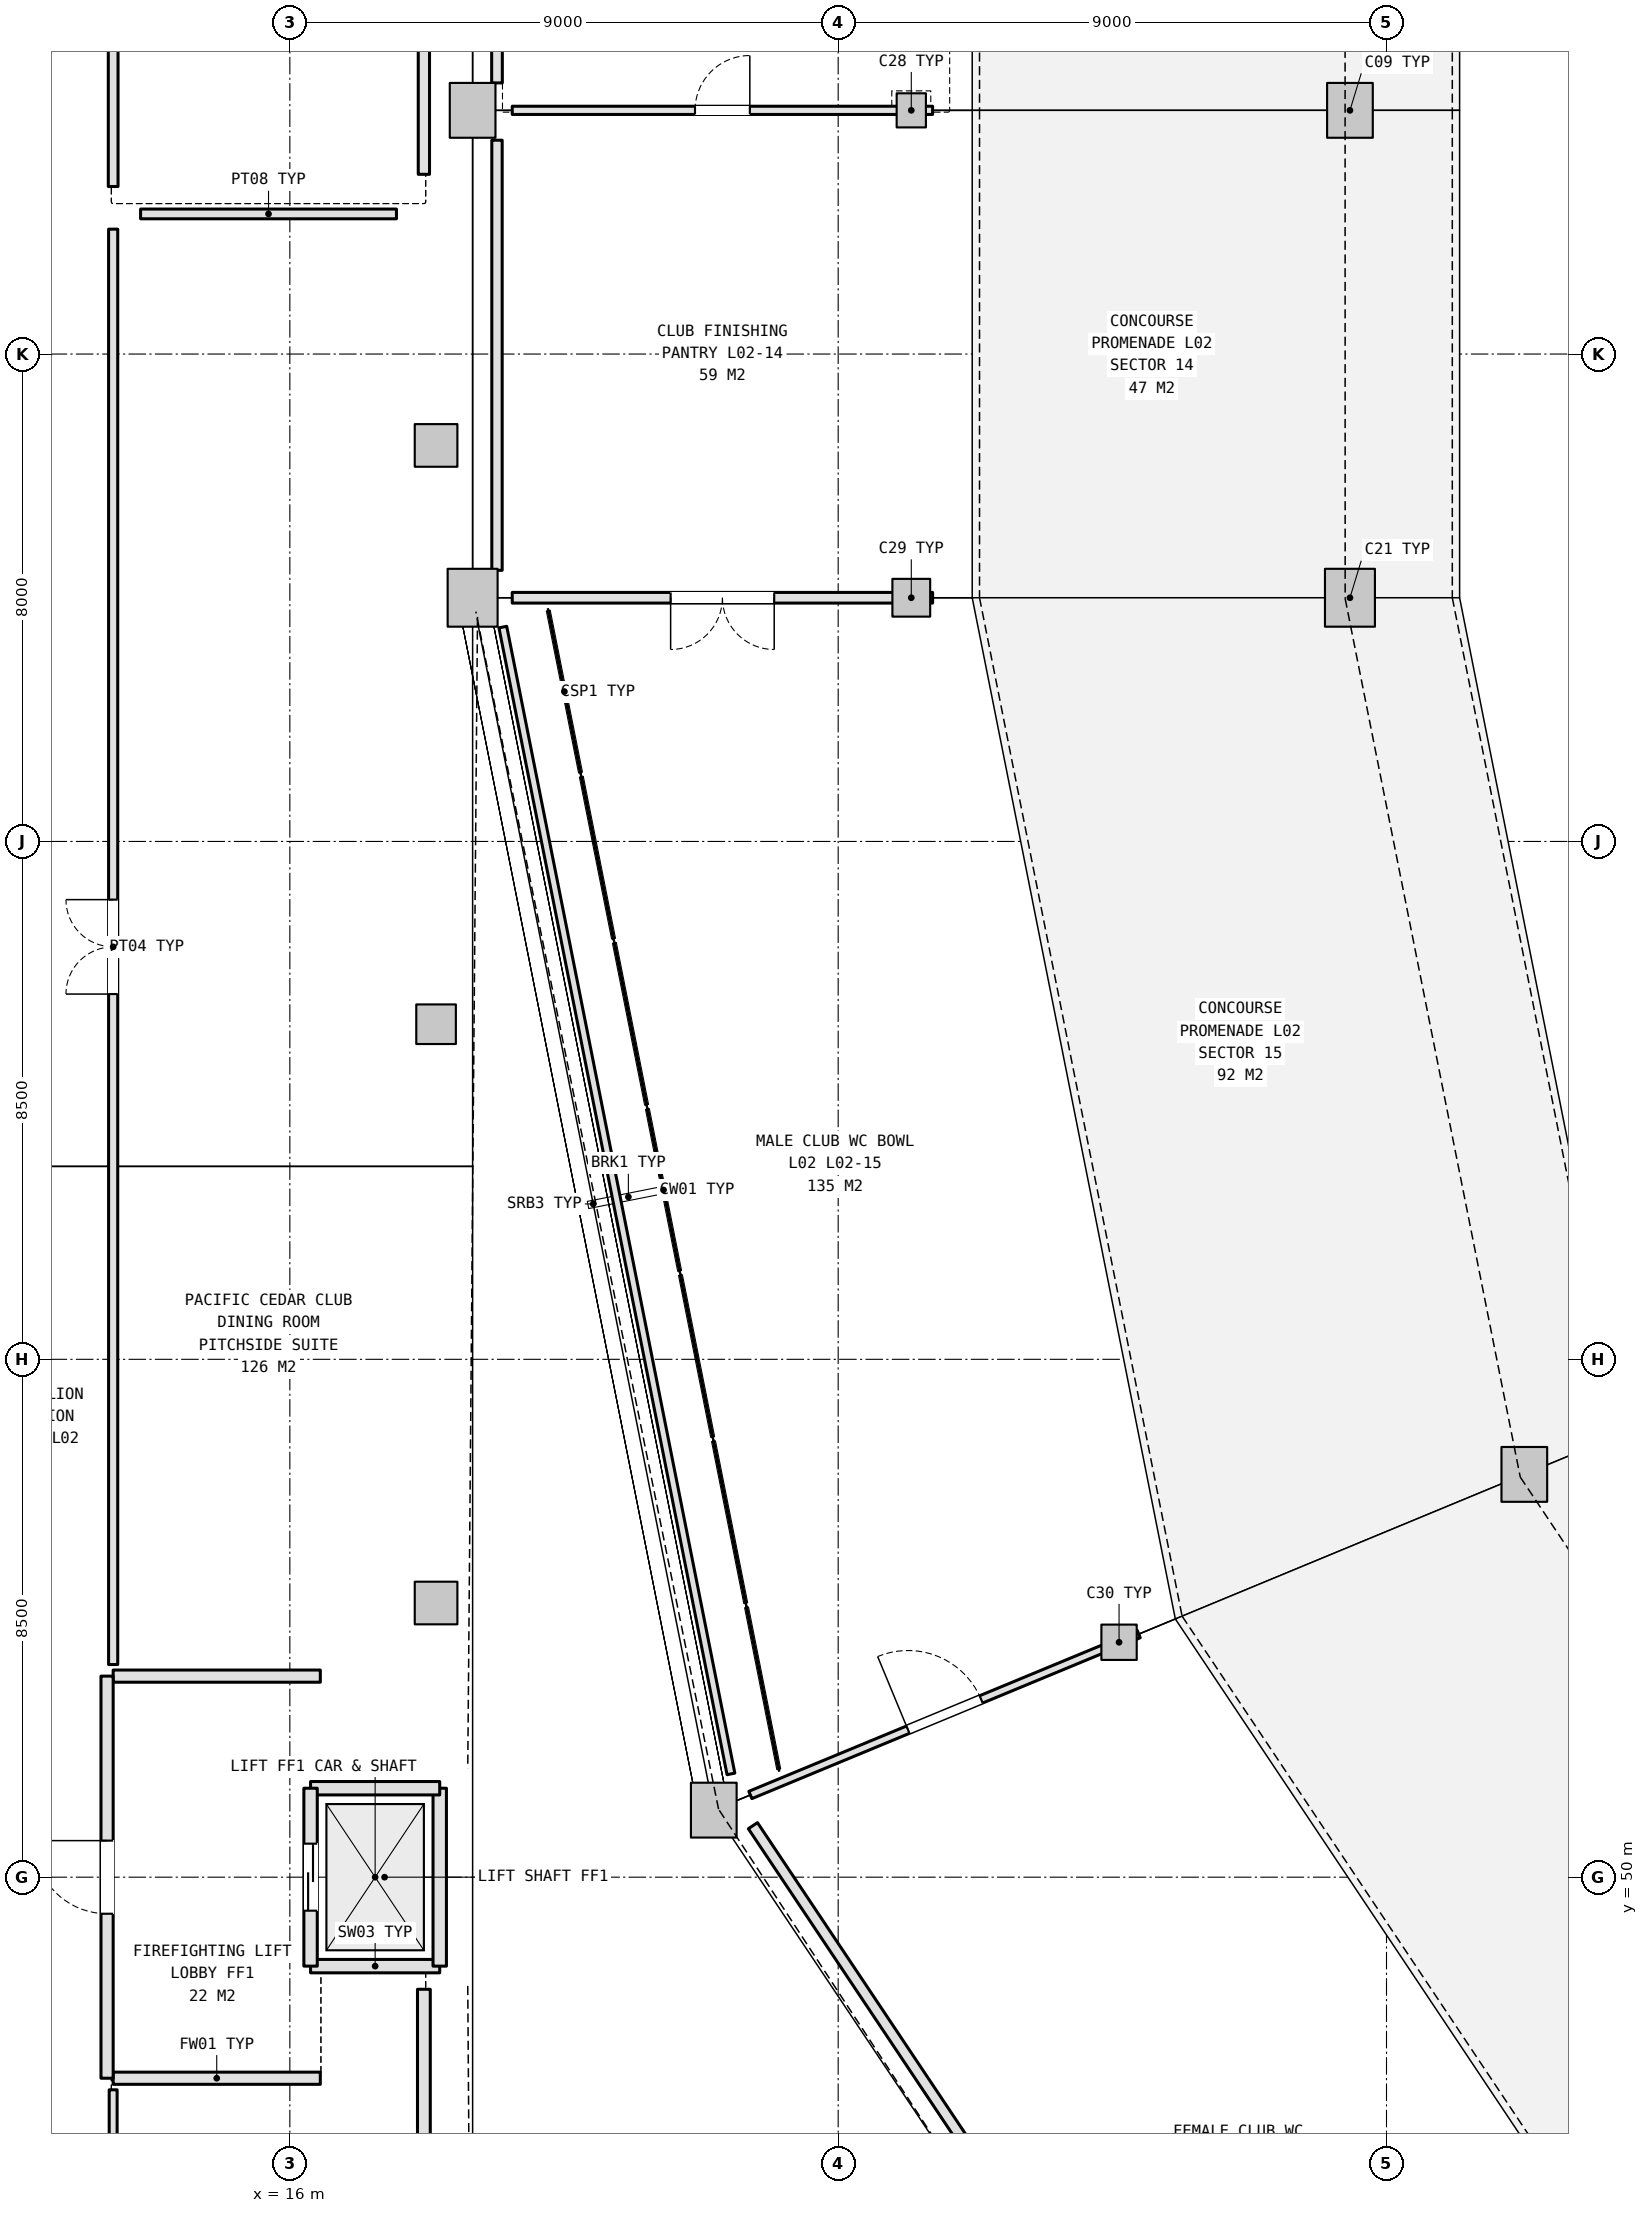
"""IFC4 building model, lengths in metres.
Left out: names, types, materials, properties, quantities, classifications, styles, units other than length and angle.
Written with IfcOpenShell. Run it as: python <this file> out.ifc"""

import sys

from ifc_helpers import new_model, si_unit, direction, frame, frame_2d, origin, origin_2d, place, context, subcontext, project, spatial, rectangle, extrude, element, fill, save


model = new_model("IFC4")
c1 = context("Model", 3, precision=1e-05, world=origin(), true_north=direction((0.0, 1.0)))
c2 = subcontext(c1, "Body", "Model", "MODEL_VIEW")
j1 = project(units=[si_unit("LENGTHUNIT", "METRE"), si_unit("PLANEANGLEUNIT", "RADIAN")], contexts=[c1])
p1 = place(None, origin())
s1 = spatial("IfcSite", under=j1, at=p1, CompositionType="ELEMENT")
p2 = place(p1, origin())
s2 = spatial("IfcBuilding", under=s1, at=p2, CompositionType="ELEMENT")
p3 = place(p2, frame((0.0, 0.0, 10.8)))
s3 = spatial("IfcBuildingStorey", under=s2, at=p3, CompositionType="ELEMENT", Elevation=10.8)
p4 = place(p3, frame((33.4, 79.0, 0.0), z_axis=(0.0, 0.0, 1.0), x_axis=(1.0, 0.0, 0.0)))
e1 = element("IfcColumn", 1, at=p4, inside=s3, PredefinedType="COLUMN", context=c2, shape_type="SweptSolid", body=[
    extrude(rectangle(XDim=0.75, YDim=0.9, at=origin_2d()), origin(), (0.0, 0.0, 1.0), 5.4),
])
p5 = place(p3, frame((26.2, 79.0, 0.0), z_axis=(0.0, 0.0, 1.0), x_axis=(1.0, 0.0, 0.0)))
e2 = element("IfcColumn", 2, at=p5, inside=s3, PredefinedType="COLUMN", context=c2, shape_type="SweptSolid", body=[
    extrude(rectangle(XDim=0.48, YDim=0.56, at=origin_2d()), origin(), (0.0, 0.0, 1.0), 5.4),
])
p6 = place(p3, frame((19.0, 79.0, 0.0), z_axis=(0.0, 0.0, 1.0), x_axis=(1.0, 0.0, 0.0)))
e3 = element("IfcColumn", 3, at=p6, inside=s3, PredefinedType="COLUMN", context=c2, shape_type="SweptSolid", body=[
    extrude(rectangle(XDim=0.75, YDim=0.9, at=origin_2d()), origin(), (0.0, 0.0, 1.0), 5.4),
])
p7 = place(p3, frame((33.4, 71.0, 0.0), z_axis=(0.0, 0.0, 1.0), x_axis=(1.0, 0.0, 0.0)))
e4 = element("IfcColumn", 4, at=p7, inside=s3, PredefinedType="COLUMN", context=c2, shape_type="SweptSolid", body=[
    extrude(rectangle(XDim=0.82, YDim=0.95, at=origin_2d()), origin(), (0.0, 0.0, 1.0), 5.4),
])
p8 = place(p3, frame((26.2, 71.0, 0.0), z_axis=(0.0, 0.0, 1.0), x_axis=(1.0, 0.0, 0.0)))
e5 = element("IfcColumn", 5, at=p8, inside=s3, PredefinedType="COLUMN", context=c2, shape_type="SweptSolid", body=[
    extrude(rectangle(XDim=0.62, YDim=0.62, at=origin_2d()), origin(), (0.0, 0.0, 1.0), 5.4),
])
p9 = place(p3, frame((19.0, 71.0, 0.0), z_axis=(0.0, 0.0, 1.0), x_axis=(1.0, 0.0, 0.0)))
e6 = element("IfcColumn", 6, at=p9, inside=s3, PredefinedType="COLUMN", context=c2, shape_type="SweptSolid", body=[
    extrude(rectangle(XDim=0.82, YDim=0.95, at=origin_2d()), origin(), (0.0, 0.0, 1.0), 5.4),
])
p10 = place(p3, frame((36.262, 56.611, 0.0), z_axis=(0.0, 0.0, 1.0), x_axis=(1.0, 0.0, 0.0)))
e7 = element("IfcColumn", 7, at=p10, inside=s3, PredefinedType="COLUMN", context=c2, shape_type="SweptSolid", body=[
    extrude(rectangle(XDim=0.75, YDim=0.9, at=origin_2d()), origin(), (0.0, 0.0, 1.0), 5.4),
])
p11 = place(p3, frame((29.61, 53.856, 0.0), z_axis=(0.0, 0.0, 1.0), x_axis=(1.0, 0.0, 0.0)))
e8 = element("IfcColumn", 8, at=p11, inside=s3, PredefinedType="COLUMN", context=c2, shape_type="SweptSolid", body=[
    extrude(rectangle(XDim=0.58, YDim=0.58, at=origin_2d()), origin(), (0.0, 0.0, 1.0), 5.4),
])
p12 = place(p3, frame((22.958, 51.1, 0.0), z_axis=(0.0, 0.0, 1.0), x_axis=(1.0, 0.0, 0.0)))
e9 = element("IfcColumn", 9, at=p12, inside=s3, PredefinedType="COLUMN", context=c2, shape_type="SweptSolid", body=[
    extrude(rectangle(XDim=0.75, YDim=0.9, at=origin_2d()), origin(), (0.0, 0.0, 1.0), 5.4),
])
p13 = place(p3, frame((18.4, 54.5, 0.0), z_axis=(0.0, 0.0, 1.0), x_axis=(1.0, 0.0, 0.0)))
e10 = element("IfcColumn", 10, at=p13, inside=s3, PredefinedType="COLUMN", context=c2, shape_type="SweptSolid", body=[
    extrude(rectangle(XDim=0.7, YDim=0.7, at=origin_2d()), origin(), (0.0, 0.0, 1.0), 5.4),
])
p14 = place(p3, frame((18.4, 64.0, 0.0), z_axis=(0.0, 0.0, 1.0), x_axis=(1.0, 0.0, 0.0)))
e11 = element("IfcColumn", 11, at=p14, inside=s3, PredefinedType="COLUMN", context=c2, shape_type="SweptSolid", body=[
    extrude(rectangle(XDim=0.65, YDim=0.65, at=origin_2d()), origin(), (0.0, 0.0, 1.0), 5.4),
])
p15 = place(p3, frame((18.4, 73.5, 0.0), z_axis=(0.0, 0.0, 1.0), x_axis=(1.0, 0.0, 0.0)))
e12 = element("IfcColumn", 12, at=p15, inside=s3, PredefinedType="COLUMN", context=c2, shape_type="SweptSolid", body=[
    extrude(rectangle(XDim=0.7, YDim=0.7, at=origin_2d()), origin(), (0.0, 0.0, 1.0), 5.4),
])
p16 = place(p3, frame((16.34, 48.54, 0.0), z_axis=(0.0, 0.0, 1.0), x_axis=(1.0, 0.0, 0.0)))
e13 = element("IfcWall", 13, at=p16, inside=s3, PredefinedType="SHEAR", context=c2, shape_type="SweptSolid", body=[
    extrude(rectangle(XDim=2.12, YDim=0.22, at=frame_2d((1.06, 0.0))), origin(), (0.0, 0.0, 1.0), 5.15),
])
p17 = place(p3, frame((18.46, 48.54, 0.0), z_axis=(0.0, 0.0, 1.0), x_axis=(0.0, 1.0, 0.0)))
e14 = element("IfcWall", 14, at=p17, inside=s3, PredefinedType="SHEAR", context=c2, shape_type="SweptSolid", body=[
    extrude(rectangle(XDim=2.92, YDim=0.22, at=frame_2d((1.46, 0.0))), origin(), (0.0, 0.0, 1.0), 5.15),
])
p18 = place(p3, frame((18.46, 51.46, 0.0), z_axis=(0.0, 0.0, 1.0), x_axis=(-1.0, 0.0, 0.0)))
e15 = element("IfcWall", 15, at=p18, inside=s3, PredefinedType="SHEAR", context=c2, shape_type="SweptSolid", body=[
    extrude(rectangle(XDim=2.12, YDim=0.22, at=frame_2d((1.06, 0.0))), origin(), (0.0, 0.0, 1.0), 5.15),
])
p19 = place(p3, frame((16.34, 51.46, 0.0), z_axis=(0.0, 0.0, 1.0), x_axis=(0.0, -1.0, 0.0)))
e16 = element("IfcWall", 16, at=p19, inside=s3, PredefinedType="SHEAR", context=c2, shape_type="SweptSolid", body=[
    extrude(rectangle(XDim=2.92, YDim=0.22, at=frame_2d((1.46, 0.0))), origin(), (0.0, 0.0, 1.0), 5.15),
])
p20 = place(p19, frame((0.91, 0.0, 0.0)))
e17 = element("IfcOpeningElement", 17, at=p20, cuts=e16, PredefinedType="OPENING", context=c2, shape_type="SweptSolid", body=[
    extrude(rectangle(XDim=1.1, YDim=2.2, at=frame_2d((0.55, 1.1))), frame((0.0, 0.12, 0.0), z_axis=(0.0, -1.0, 0.0), x_axis=(1.0, 0.0, 0.0)), (0.0, 0.0, 1.0), 0.24),
])
for number, where, z_axis, x_axis in (
    (18, (13.1, 46.7, 0.0), (0.0, 0.0, 1.0), (1.0, 0.0, 0.0)),
    (19, (16.5, 53.3, 0.0), (0.0, 0.0, 1.0), (-1.0, 0.0, 0.0)),
):
    element("IfcWall", number, at=place(p3, frame(where, z_axis=z_axis, x_axis=x_axis)), inside=s3, PredefinedType="SOLIDWALL", context=c2, shape_type="SweptSolid", body=[
        extrude(rectangle(XDim=3.4, YDim=0.2, at=frame_2d((1.7, 0.0))), origin(), (0.0, 0.0, 1.0), 5.12),
    ])
p21 = place(p3, frame((13.0, 53.3, 0.0), z_axis=(0.0, 0.0, 1.0), x_axis=(0.0, -1.0, 0.0)))
e20 = element("IfcWall", 20, at=p21, inside=s3, PredefinedType="SOLIDWALL", context=c2, shape_type="SweptSolid", body=[
    extrude(rectangle(XDim=6.6, YDim=0.2, at=frame_2d((3.3, 0.0))), origin(), (0.0, 0.0, 1.0), 5.12),
])
p22 = place(p21, frame((2.7, 0.0, 0.0)))
e21 = element("IfcOpeningElement", 21, at=p22, cuts=e20, PredefinedType="OPENING", context=c2, shape_type="SweptSolid", body=[
    extrude(rectangle(XDim=1.2, YDim=2.2, at=frame_2d((0.6, 1.1))), frame((0.0, 0.11, 0.0), z_axis=(0.0, -1.0, 0.0), x_axis=(1.0, 0.0, 0.0)), (0.0, 0.0, 1.0), 0.22),
])
p23 = place(p3, frame((13.1, 19.75, 0.0), z_axis=(0.0, 0.0, 1.0), x_axis=(0.0, 1.0, 0.0)))
e22 = element("IfcWall", 22, at=p23, inside=s3, PredefinedType="PARTITIONING", context=c2, shape_type="SweptSolid", body=[
    extrude(rectangle(XDim=26.76, YDim=0.13, at=frame_2d((13.38, 0.0))), origin(), (0.0, 0.0, 1.0), 4.678),
])
p24 = place(p23, frame((12.53, 0.0, 0.0)))
e23 = element("IfcOpeningElement", 23, at=p24, cuts=e22, PredefinedType="OPENING", context=c2, shape_type="SweptSolid", body=[
    extrude(rectangle(XDim=1.7, YDim=2.25, at=frame_2d((0.85, 1.125))), frame((0.0, 0.075, 0.0), z_axis=(0.0, -1.0, 0.0), x_axis=(1.0, 0.0, 0.0)), (0.0, 0.0, 1.0), 0.15),
])
p25 = place(p3, frame((18.2, 48.16, 0.0), z_axis=(0.0, 0.0, 1.0), x_axis=(0.0, -1.0, 0.0)))
e24 = element("IfcWall", 24, at=p25, inside=s3, PredefinedType="PLUMBINGWALL", context=c2, shape_type="SweptSolid", body=[
    extrude(rectangle(XDim=28.21, YDim=0.21, at=frame_2d((14.105, 0.0))), origin(), (0.0, 0.0, 1.0), 4.485),
])
p26 = place(p3, frame((13.1, 53.49, 0.0), z_axis=(0.0, 0.0, 1.0), x_axis=(0.0, 1.0, 0.0)))
e25 = element("IfcWall", 25, at=p26, inside=s3, PredefinedType="PARTITIONING", context=c2, shape_type="SweptSolid", body=[
    extrude(rectangle(XDim=23.56, YDim=0.15, at=frame_2d((11.78, 0.0))), origin(), (0.0, 0.0, 1.0), 4.678),
])
p27 = place(p26, frame((11.005, 0.0, 0.0)))
e26 = element("IfcOpeningElement", 26, at=p27, cuts=e25, PredefinedType="OPENING", context=c2, shape_type="SweptSolid", body=[
    extrude(rectangle(XDim=1.55, YDim=2.15, at=frame_2d((0.775, 1.075))), frame((0.0, 0.085, 0.0), z_axis=(0.0, -1.0, 0.0), x_axis=(1.0, 0.0, 0.0)), (0.0, 0.0, 1.0), 0.17),
])
p28 = place(p3, frame((13.55, 77.3, 0.0), z_axis=(0.0, 0.0, 1.0), x_axis=(1.0, 0.0, 0.0)))
e27 = element("IfcWall", 27, at=p28, inside=s3, PredefinedType="PARTITIONING", context=c2, shape_type="SweptSolid", body=[
    extrude(rectangle(XDim=4.2, YDim=0.16, at=frame_2d((2.1, 0.0))), origin(), (0.0, 0.0, 1.0), 5.12),
])
p29 = place(p3, frame((13.1, 77.75, 0.0), z_axis=(0.0, 0.0, 1.0), x_axis=(0.0, 1.0, 0.0)))
e28 = element("IfcWall", 28, at=p29, inside=s3, PredefinedType="PARTITIONING", context=c2, shape_type="SweptSolid", body=[
    extrude(rectangle(XDim=13.76, YDim=0.16, at=frame_2d((6.88, 0.0))), origin(), (0.0, 0.0, 1.0), 4.678),
])
p30 = place(p29, frame((6.305, 0.0, 0.0)))
e29 = element("IfcOpeningElement", 29, at=p30, cuts=e28, PredefinedType="OPENING", context=c2, shape_type="SweptSolid", body=[
    extrude(rectangle(XDim=1.15, YDim=2.2, at=frame_2d((0.575, 1.1))), frame((0.0, 0.09, 0.0), z_axis=(0.0, -1.0, 0.0), x_axis=(1.0, 0.0, 0.0)), (0.0, 0.0, 1.0), 0.18),
])
p31 = place(p3, frame((18.2, 98.85, 0.0), z_axis=(0.0, 0.0, 1.0), x_axis=(0.0, -1.0, 0.0)))
e30 = element("IfcWall", 30, at=p31, inside=s3, PredefinedType="PARTITIONING", context=c2, shape_type="SweptSolid", body=[
    extrude(rectangle(XDim=20.9, YDim=0.185, at=frame_2d((10.45, 0.0))), origin(), (0.0, 0.0, 1.0), 4.485),
])
p32 = place(p3, frame((26.55, 79.0, 0.0), z_axis=(0.0, 0.0, 1.0), x_axis=(-1.0, 0.0, 0.0)))
e31 = element("IfcWall", 31, at=p32, inside=s3, PredefinedType="PARTITIONING", context=c2, shape_type="SweptSolid", body=[
    extrude(rectangle(XDim=6.9, YDim=0.135, at=frame_2d((3.45, 0.0))), origin(), (0.0, 0.0, 1.0), 4.255),
])
p33 = place(p32, frame((3.0, 0.0, 0.0)))
e32 = element("IfcOpeningElement", 32, at=p33, cuts=e31, PredefinedType="OPENING", context=c2, shape_type="SweptSolid", body=[
    extrude(rectangle(XDim=0.9, YDim=2.1, at=frame_2d((0.45, 1.05))), frame((0.0, 0.077, 0.0), z_axis=(0.0, -1.0, 0.0), x_axis=(1.0, 0.0, 0.0)), (0.0, 0.0, 1.0), 0.155),
])
p34 = place(p3, frame((19.4, 79.45, 0.0), z_axis=(0.0, 0.0, 1.0), x_axis=(0.0, 1.0, 0.0)))
e33 = element("IfcWall", 33, at=p34, inside=s3, PredefinedType="PARTITIONING", context=c2, shape_type="SweptSolid", body=[
    extrude(rectangle(XDim=7.06, YDim=0.175, at=frame_2d((3.53, 0.0))), origin(), (0.0, 0.0, 1.0), 5.12),
])
p35 = place(p3, frame((26.55, 71.0, 0.0), z_axis=(0.0, 0.0, 1.0), x_axis=(-1.0, 0.0, 0.0)))
e34 = element("IfcWall", 34, at=p35, inside=s3, PredefinedType="PARTITIONING", context=c2, shape_type="SweptSolid", body=[
    extrude(rectangle(XDim=6.9, YDim=0.175, at=frame_2d((3.45, 0.0))), origin(), (0.0, 0.0, 1.0), 4.285),
])
p36 = place(p35, frame((2.6, 0.0, 0.0)))
e35 = element("IfcOpeningElement", 35, at=p36, cuts=e34, PredefinedType="OPENING", context=c2, shape_type="SweptSolid", body=[
    extrude(rectangle(XDim=1.7, YDim=2.25, at=frame_2d((0.85, 1.125))), frame((0.0, 0.097, 0.0), z_axis=(0.0, -1.0, 0.0), x_axis=(1.0, 0.0, 0.0)), (0.0, 0.0, 1.0), 0.195),
])
p37 = place(p3, frame((19.4, 71.45, 0.0), z_axis=(0.0, 0.0, 1.0), x_axis=(0.0, 1.0, 0.0)))
e36 = element("IfcWall", 36, at=p37, inside=s3, PredefinedType="PARTITIONING", context=c2, shape_type="SweptSolid", body=[
    extrude(rectangle(XDim=7.06, YDim=0.17, at=frame_2d((3.53, 0.0))), origin(), (0.0, 0.0, 1.0), 5.12),
])
p38 = place(p3, frame((29.934, 53.99, 0.0), z_axis=(0.0, 0.0, 1.0), x_axis=(-0.923873656974, -0.38269761686, 0.0)))
e37 = element("IfcWall", 37, at=p38, inside=s3, PredefinedType="PARTITIONING", context=c2, shape_type="SweptSolid", body=[
    extrude(rectangle(XDim=6.9, YDim=0.13, at=frame_2d((3.45, 0.0))), origin(), (0.0, 0.0, 1.0), 4.215),
])
p39 = place(p38, frame((2.8, 0.0, 0.0)))
e38 = element("IfcOpeningElement", 38, at=p39, cuts=e37, PredefinedType="OPENING", context=c2, shape_type="SweptSolid", body=[
    extrude(rectangle(XDim=1.3, YDim=2.2, at=frame_2d((0.65, 1.1))), frame((0.0, 0.075, 0.0), z_axis=(0.0, -1.0, 0.0), x_axis=(1.0, 0.0, 0.0)), (0.0, 0.0, 1.0), 0.15),
])
p40 = place(p3, frame((23.24, 51.695, 0.0), z_axis=(0.0, 0.0, 1.0), x_axis=(-0.195083697793, 0.98078659802, 0.0)))
e39 = element("IfcWall", 39, at=p40, inside=s3, PredefinedType="PARTITIONING", context=c2, shape_type="SweptSolid", body=[
    extrude(rectangle(XDim=19.192, YDim=0.13, at=frame_2d((9.596, 0.0))), origin(), (0.0, 0.0, 1.0), 5.12),
])
p41 = place(p3, frame((34.263, 34.887, 0.0), z_axis=(0.0, 0.0, 1.0), x_axis=(-0.555562946988, 0.831474480627, 0.0)))
e40 = element("IfcWall", 40, at=p41, inside=s3, PredefinedType="PARTITIONING", context=c2, shape_type="SweptSolid", body=[
    extrude(rectangle(XDim=19.192, YDim=0.18, at=frame_2d((9.596, 0.0))), origin(), (0.0, 0.0, 1.0), 5.12),
])
p42 = place(p20, origin())
e41 = element("IfcDoor", 41, at=p42, inside=s3, OperationType="DOUBLE_DOOR_SLIDING", PredefinedType="DOOR", context=c2, shape_type="SweptSolid", body=[
    extrude(rectangle(XDim=1.1, YDim=2.2, at=frame_2d((0.55, 1.1))), frame((0.0, 0.025, 0.0), z_axis=(0.0, -1.0, 0.0), x_axis=(1.0, 0.0, 0.0)), (0.0, 0.0, 1.0), 0.05),
])
fill(e17, e41)
p43 = place(p22, frame((1.2, 0.0, 0.0), z_axis=(0.0, 0.0, 1.0), x_axis=(-1.0, 0.0, 0.0)))
e42 = element("IfcDoor", 42, at=p43, inside=s3, OperationType="SINGLE_SWING_LEFT", PredefinedType="DOOR", context=c2, shape_type="SweptSolid", body=[
    extrude(rectangle(XDim=1.2, YDim=2.2, at=frame_2d((0.6, 1.1))), frame((0.0, 0.025, 0.0), z_axis=(0.0, -1.0, 0.0), x_axis=(1.0, 0.0, 0.0)), (0.0, 0.0, 1.0), 0.05),
])
fill(e21, e42)
p44 = place(p27, origin())
e43 = element("IfcDoor", 43, at=p44, inside=s3, OperationType="DOUBLE_DOOR_SINGLE_SWING", PredefinedType="DOOR", context=c2, shape_type="SweptSolid", body=[
    extrude(rectangle(XDim=1.55, YDim=2.15, at=frame_2d((0.775, 1.075))), frame((0.0, 0.025, 0.0), z_axis=(0.0, -1.0, 0.0), x_axis=(1.0, 0.0, 0.0)), (0.0, 0.0, 1.0), 0.05),
])
fill(e26, e43)
p45 = place(p33, frame((0.9, 0.0, 0.0), z_axis=(0.0, 0.0, 1.0), x_axis=(-1.0, 0.0, 0.0)))
e44 = element("IfcDoor", 44, at=p45, inside=s3, OperationType="SINGLE_SWING_LEFT", PredefinedType="DOOR", context=c2, shape_type="SweptSolid", body=[
    extrude(rectangle(XDim=0.9, YDim=2.1, at=frame_2d((0.45, 1.05))), frame((0.0, 0.025, 0.0), z_axis=(0.0, -1.0, 0.0), x_axis=(1.0, 0.0, 0.0)), (0.0, 0.0, 1.0), 0.05),
])
fill(e32, e44)
p46 = place(p36, origin())
e45 = element("IfcDoor", 45, at=p46, inside=s3, OperationType="DOUBLE_DOOR_SINGLE_SWING", PredefinedType="DOOR", context=c2, shape_type="SweptSolid", body=[
    extrude(rectangle(XDim=1.7, YDim=2.25, at=frame_2d((0.85, 1.125))), frame((0.0, 0.025, 0.0), z_axis=(0.0, -1.0, 0.0), x_axis=(1.0, 0.0, 0.0)), (0.0, 0.0, 1.0), 0.05),
])
fill(e35, e45)
p47 = place(p39, frame((1.3, 0.0, 0.0), z_axis=(0.0, 0.0, 1.0), x_axis=(-1.0, 0.0, 0.0)))
e46 = element("IfcDoor", 46, at=p47, inside=s3, OperationType="SINGLE_SWING_RIGHT", PredefinedType="DOOR", context=c2, shape_type="SweptSolid", body=[
    extrude(rectangle(XDim=1.3, YDim=2.2, at=frame_2d((0.65, 1.1))), frame((0.0, 0.025, 0.0), z_axis=(0.0, -1.0, 0.0), x_axis=(1.0, 0.0, 0.0)), (0.0, 0.0, 1.0), 0.05),
])
fill(e38, e46)
save(model, sys.argv[1])
